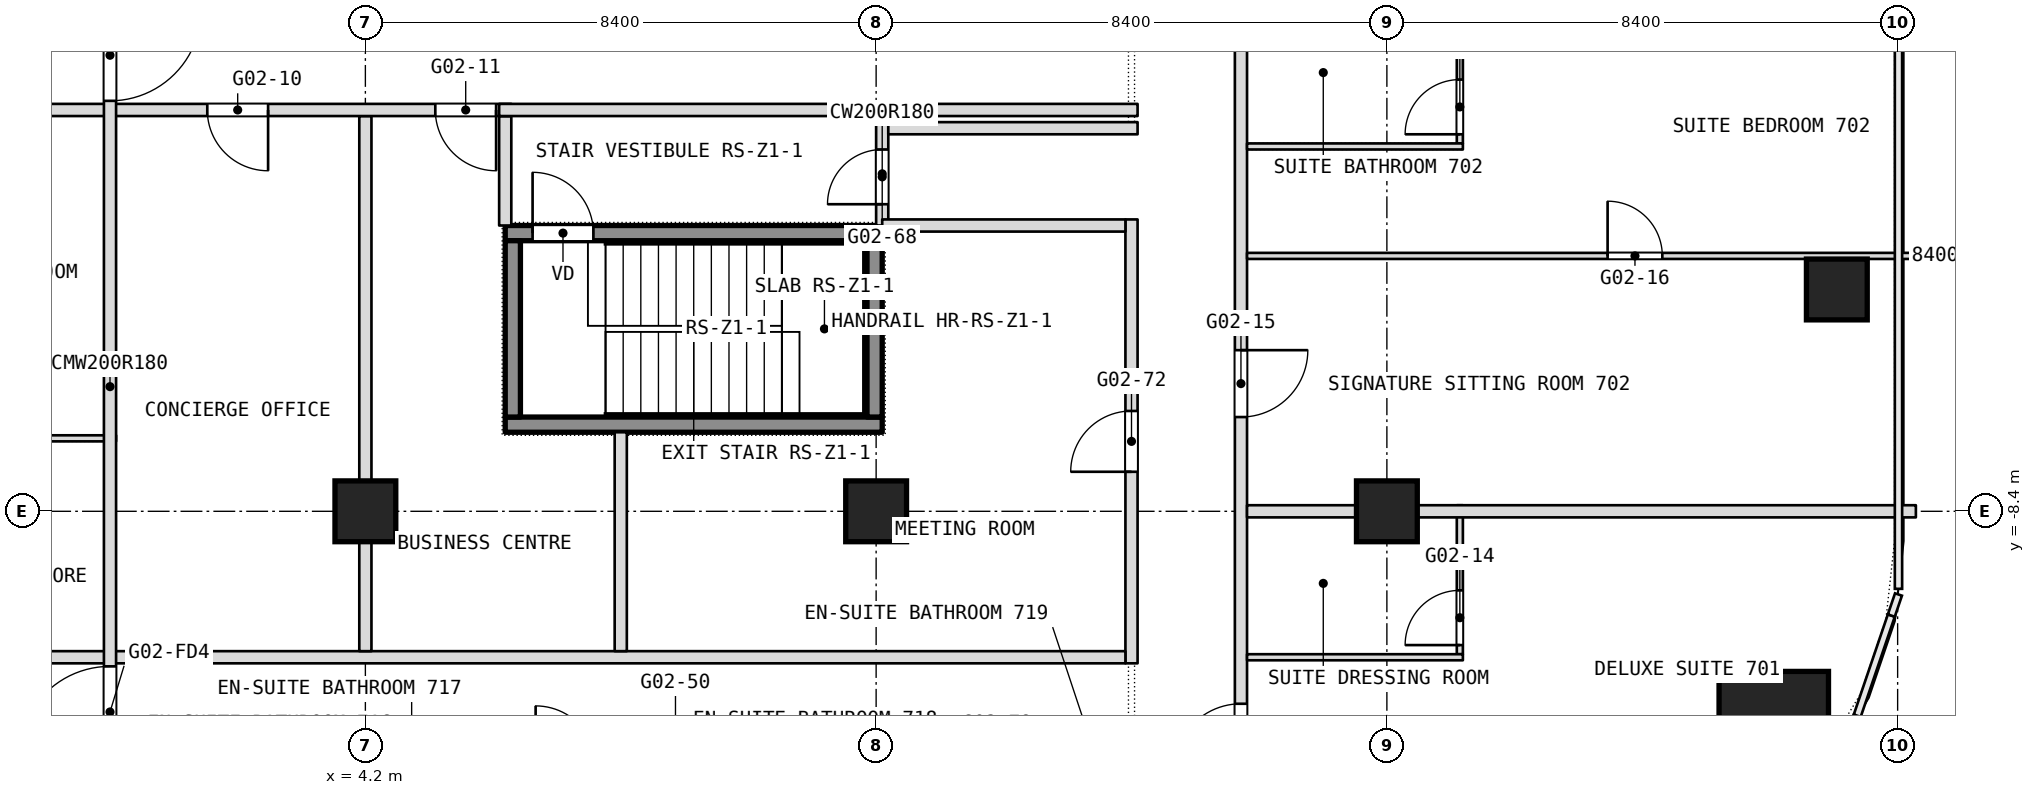
"""IFC4 building model, lengths in metres.
Left out: names, types, materials, properties, quantities, classifications, styles, units other than length and angle.
Written with IfcOpenShell. Run it as: python <this file> out.ifc"""

import sys

from ifc_helpers import new_model, si_unit, direction, frame, frame_2d, origin, origin_2d, place, context, subcontext, project, spatial, rectangle, extrude, element, fill, save


model = new_model("IFC4")
c1 = context("Model", 3, precision=1e-05, world=origin(), true_north=direction((0.0, 1.0)))
c2 = subcontext(c1, "Body", "Model", "MODEL_VIEW")
j1 = project(units=[si_unit("LENGTHUNIT", "METRE"), si_unit("PLANEANGLEUNIT", "RADIAN")], contexts=[c1])
p1 = place(None, origin())
s1 = spatial("IfcSite", under=j1, at=p1, CompositionType="ELEMENT")
p2 = place(p1, origin())
s2 = spatial("IfcBuilding", under=s1, at=p2, CompositionType="ELEMENT")
p3 = place(p2, frame((0.0, 0.0, 40.1)))
s3 = spatial("IfcBuildingStorey", under=s2, at=p3, CompositionType="ELEMENT", Elevation=40.1)
p4 = place(p3, frame((27.363, -11.933, 0.0), z_axis=(0.0, 0.0, 1.0), x_axis=(1.0, 0.0, 0.0)))
e1 = element("IfcColumn", 1, at=p4, inside=s3, PredefinedType="COLUMN", context=c2, shape_type="SweptSolid", body=[
    extrude(rectangle(XDim=1.8, YDim=1.8, at=origin_2d()), origin(), (0.0, 0.0, 1.0), 3.6),
])
for number, where, z_axis, x_axis in (
    (2, (4.2, -8.4, 0.0), (0.0, 0.0, 1.0), (1.0, 0.0, 0.0)),
    (3, (12.6, -8.4, 0.0), (0.0, 0.0, 1.0), (1.0, 0.0, 0.0)),
    (4, (21.0, -8.4, 0.0), (0.0, 0.0, 1.0), (1.0, 0.0, 0.0)),
    (5, (28.4, -4.752, 0.0), (0.0, 0.0, 1.0), (1.0, 0.0, 0.0)),
):
    element("IfcColumn", number, at=place(p3, frame(where, z_axis=z_axis, x_axis=x_axis)), inside=s3, PredefinedType="COLUMN", context=c2, shape_type="SweptSolid", body=[
        extrude(rectangle(XDim=1.0, YDim=1.0, at=origin_2d()), origin(), (0.0, 0.0, 1.0), 3.6),
    ])
p5 = place(p3, frame((22.2, -10.75, 0.0), z_axis=(0.0, 0.0, 1.0), x_axis=(0.0, 1.0, 0.0)))
e6 = element("IfcWall", 6, at=p5, inside=s3, PredefinedType="PARTITIONING", context=c2, shape_type="SweptSolid", body=[
    extrude(rectangle(XDim=2.45, YDim=0.1, at=frame_2d((1.225, 0.0))), origin(), (0.0, 0.0, 1.0), 3.34),
])
p6 = place(p5, frame((0.15, 0.0, 0.0)))
e7 = element("IfcOpeningElement", 7, at=p6, cuts=e6, PredefinedType="OPENING", context=c2, shape_type="SweptSolid", body=[
    extrude(rectangle(XDim=0.9, YDim=2.1, at=frame_2d((0.45, 1.05))), frame((0.0, 0.05, 0.0), z_axis=(0.0, -1.0, 0.0), x_axis=(1.0, 0.0, 0.0)), (0.0, 0.0, 1.0), 0.1),
])
p7 = place(p3, frame((22.2, -2.35, 0.0), z_axis=(0.0, 0.0, 1.0), x_axis=(0.0, 1.0, 0.0)))
e8 = element("IfcWall", 8, at=p7, inside=s3, PredefinedType="PARTITIONING", context=c2, shape_type="SweptSolid", body=[
    extrude(rectangle(XDim=2.45, YDim=0.1, at=frame_2d((1.225, 0.0))), origin(), (0.0, 0.0, 1.0), 3.34),
])
p8 = place(p7, frame((0.15, 0.0, 0.0)))
e9 = element("IfcOpeningElement", 9, at=p8, cuts=e8, PredefinedType="OPENING", context=c2, shape_type="SweptSolid", body=[
    extrude(rectangle(XDim=0.9, YDim=2.1, at=frame_2d((0.45, 1.05))), frame((0.0, 0.05, 0.0), z_axis=(0.0, -1.0, 0.0), x_axis=(1.0, 0.0, 0.0)), (0.0, 0.0, 1.0), 0.1),
])
p9 = place(p3, frame((18.6, -16.665, 0.0), z_axis=(0.0, 0.0, 1.0), x_axis=(0.0, 1.0, 0.0)))
e10 = element("IfcWall", 10, at=p9, inside=s3, PredefinedType="PARTITIONING", context=c2, shape_type="SweptSolid", body=[
    extrude(rectangle(XDim=50.205, YDim=0.2, at=frame_2d((25.103, 0.0))), origin(), (0.0, 0.0, 1.0), 3.34),
])
p10 = place(p9, frame((4.0, 0.0, 0.0)))
e11 = element("IfcOpeningElement", 11, at=p10, cuts=e10, PredefinedType="OPENING", context=c2, shape_type="SweptSolid", body=[
    extrude(rectangle(XDim=1.1, YDim=2.1, at=frame_2d((0.55, 1.05))), frame((0.0, 0.1, 0.0), z_axis=(0.0, -1.0, 0.0), x_axis=(1.0, 0.0, 0.0)), (0.0, 0.0, 1.0), 0.2),
])
p11 = place(p9, frame((9.815, 0.0, 0.0)))
e12 = element("IfcOpeningElement", 12, at=p11, cuts=e10, PredefinedType="OPENING", context=c2, shape_type="SweptSolid", body=[
    extrude(rectangle(XDim=1.1, YDim=2.1, at=frame_2d((0.55, 1.05))), frame((0.0, 0.1, 0.0), z_axis=(0.0, -1.0, 0.0), x_axis=(1.0, 0.0, 0.0)), (0.0, 0.0, 1.0), 0.2),
])
p12 = place(p9, frame((19.965, 0.0, 0.0)))
e13 = element("IfcOpeningElement", 13, at=p12, cuts=e10, PredefinedType="OPENING", context=c2, shape_type="SweptSolid", body=[
    extrude(rectangle(XDim=1.8, YDim=2.1, at=frame_2d((0.9, 1.05))), frame((0.0, 0.1, 0.0), z_axis=(0.0, -1.0, 0.0), x_axis=(1.0, 0.0, 0.0)), (0.0, 0.0, 1.0), 0.2),
])
p13 = place(p9, frame((25.465, 0.0, 0.0)))
e14 = element("IfcOpeningElement", 14, at=p13, cuts=e10, PredefinedType="OPENING", context=c2, shape_type="SweptSolid", body=[
    extrude(rectangle(XDim=1.0, YDim=2.1, at=frame_2d((0.5, 1.05))), frame((0.0, 0.1, 0.0), z_axis=(0.0, -1.0, 0.0), x_axis=(1.0, 0.0, 0.0)), (0.0, 0.0, 1.0), 0.2),
])
p14 = place(p9, frame((32.065, 0.0, 0.0)))
e15 = element("IfcOpeningElement", 15, at=p14, cuts=e10, PredefinedType="OPENING", context=c2, shape_type="SweptSolid", body=[
    extrude(rectangle(XDim=1.0, YDim=2.1, at=frame_2d((0.5, 1.05))), frame((0.0, 0.1, 0.0), z_axis=(0.0, -1.0, 0.0), x_axis=(1.0, 0.0, 0.0)), (0.0, 0.0, 1.0), 0.2),
])
p15 = place(p9, frame((37.165, 0.0, 0.0)))
e16 = element("IfcOpeningElement", 16, at=p15, cuts=e10, PredefinedType="OPENING", context=c2, shape_type="SweptSolid", body=[
    extrude(rectangle(XDim=1.1, YDim=2.1, at=frame_2d((0.55, 1.05))), frame((0.0, 0.1, 0.0), z_axis=(0.0, -1.0, 0.0), x_axis=(1.0, 0.0, 0.0)), (0.0, 0.0, 1.0), 0.2),
])
p16 = place(p9, frame((42.265, 0.0, 0.0)))
e17 = element("IfcOpeningElement", 17, at=p16, cuts=e10, PredefinedType="OPENING", context=c2, shape_type="SweptSolid", body=[
    extrude(rectangle(XDim=1.0, YDim=2.1, at=frame_2d((0.5, 1.05))), frame((0.0, 0.1, 0.0), z_axis=(0.0, -1.0, 0.0), x_axis=(1.0, 0.0, 0.0)), (0.0, 0.0, 1.0), 0.2),
])
p17 = place(p9, frame((46.865, 0.0, 0.0)))
e18 = element("IfcOpeningElement", 18, at=p17, cuts=e10, PredefinedType="OPENING", context=c2, shape_type="SweptSolid", body=[
    extrude(rectangle(XDim=1.0, YDim=2.1, at=frame_2d((0.5, 1.05))), frame((0.0, 0.1, 0.0), z_axis=(0.0, -1.0, 0.0), x_axis=(1.0, 0.0, 0.0)), (0.0, 0.0, 1.0), 0.2),
])
p18 = place(p3, frame((16.8, -10.9, 0.0), z_axis=(0.0, 0.0, 1.0), x_axis=(0.0, 1.0, 0.0)))
e19 = element("IfcWall", 19, at=p18, inside=s3, PredefinedType="PARTITIONING", context=c2, shape_type="SweptSolid", body=[
    extrude(rectangle(XDim=7.3, YDim=0.2, at=frame_2d((3.65, 0.0))), origin(), (0.0, 0.0, 1.0), 3.34),
])
p19 = place(p18, frame((3.15, 0.0, 0.0)))
e20 = element("IfcOpeningElement", 20, at=p19, cuts=e19, PredefinedType="OPENING", context=c2, shape_type="SweptSolid", body=[
    extrude(rectangle(XDim=1.0, YDim=2.1, at=frame_2d((0.5, 1.05))), frame((0.0, 0.1, 0.0), z_axis=(0.0, -1.0, 0.0), x_axis=(1.0, 0.0, 0.0)), (0.0, 0.0, 1.0), 0.2),
])
p20 = place(p3, frame((12.7, -3.7, 0.0), z_axis=(0.0, 0.0, 1.0), x_axis=(0.0, 1.0, 0.0)))
e21 = element("IfcWall", 21, at=p20, inside=s3, PredefinedType="PARTITIONING", context=c2, shape_type="SweptSolid", body=[
    extrude(rectangle(XDim=1.7, YDim=0.2, at=frame_2d((0.85, 0.0))), origin(), (0.0, 0.0, 1.0), 3.34),
])
p21 = place(p20, frame((0.35, 0.0, 0.0)))
e22 = element("IfcOpeningElement", 22, at=p21, cuts=e21, PredefinedType="OPENING", context=c2, shape_type="SweptSolid", body=[
    extrude(rectangle(XDim=0.9, YDim=2.1, at=frame_2d((0.45, 1.05))), frame((0.0, 0.1, 0.0), z_axis=(0.0, -1.0, 0.0), x_axis=(1.0, 0.0, 0.0)), (0.0, 0.0, 1.0), 0.2),
])
p22 = place(p3, frame((18.7, -10.8, 0.0), z_axis=(0.0, 0.0, 1.0), x_axis=(1.0, 0.0, 0.0)))
e23 = element("IfcWall", 23, at=p22, inside=s3, PredefinedType="PARTITIONING", context=c2, shape_type="SweptSolid", body=[
    extrude(rectangle(XDim=3.55, YDim=0.1, at=frame_2d((1.775, 0.0))), origin(), (0.0, 0.0, 1.0), 3.34),
])
p23 = place(p3, frame((-4.1, -10.8, 0.0), z_axis=(0.0, 0.0, 1.0), x_axis=(1.0, 0.0, 0.0)))
e24 = element("IfcWall", 24, at=p23, inside=s3, PredefinedType="PARTITIONING", context=c2, shape_type="SweptSolid", body=[
    extrude(rectangle(XDim=20.8, YDim=0.2, at=frame_2d((10.4, 0.0))), origin(), (0.0, 0.0, 1.0), 3.34),
])
p24 = place(p3, frame((8.4, -10.7, 0.0), z_axis=(0.0, 0.0, 1.0), x_axis=(0.0, 1.0, 0.0)))
e25 = element("IfcWall", 25, at=p24, inside=s3, PredefinedType="PARTITIONING", context=c2, shape_type="SweptSolid", body=[
    extrude(rectangle(XDim=3.6, YDim=0.2, at=frame_2d((1.8, 0.0))), origin(), (0.0, 0.0, 1.0), 3.34),
])
p25 = place(p3, frame((18.7, -8.4, 0.0), z_axis=(0.0, 0.0, 1.0), x_axis=(1.0, 0.0, 0.0)))
e26 = element("IfcWall", 26, at=p25, inside=s3, PredefinedType="PARTITIONING", context=c2, shape_type="SweptSolid", body=[
    extrude(rectangle(XDim=11.0, YDim=0.2, at=frame_2d((5.5, 0.0))), origin(), (0.0, 0.0, 1.0), 2.84),
])
p26 = place(p3, frame((-4.1, -7.2, 0.0), z_axis=(0.0, 0.0, 1.0), x_axis=(1.0, 0.0, 0.0)))
e27 = element("IfcWall", 27, at=p26, inside=s3, PredefinedType="PARTITIONING", context=c2, shape_type="SweptSolid", body=[
    extrude(rectangle(XDim=4.2, YDim=0.1, at=frame_2d((2.1, 0.0))), origin(), (0.0, 0.0, 1.0), 3.34),
])
p27 = place(p26, frame((1.55, 0.0, 0.0)))
e28 = element("IfcOpeningElement", 28, at=p27, cuts=e27, PredefinedType="OPENING", context=c2, shape_type="SweptSolid", body=[
    extrude(rectangle(XDim=0.9, YDim=2.1, at=frame_2d((0.45, 1.05))), frame((0.0, 0.05, 0.0), z_axis=(0.0, -1.0, 0.0), x_axis=(1.0, 0.0, 0.0)), (0.0, 0.0, 1.0), 0.1),
])
p28 = place(p3, frame((6.5, -3.7, 0.0), z_axis=(0.0, 0.0, 1.0), x_axis=(0.0, 1.0, 0.0)))
e29 = element("IfcWall", 29, at=p28, inside=s3, PredefinedType="PARTITIONING", context=c2, shape_type="SweptSolid", body=[
    extrude(rectangle(XDim=1.8, YDim=0.2, at=frame_2d((0.9, 0.0))), origin(), (0.0, 0.0, 1.0), 3.34),
])
p29 = place(p3, frame((4.2, -10.7, 0.0), z_axis=(0.0, 0.0, 1.0), x_axis=(0.0, 1.0, 0.0)))
e30 = element("IfcWall", 30, at=p29, inside=s3, PredefinedType="PARTITIONING", context=c2, shape_type="SweptSolid", body=[
    extrude(rectangle(XDim=8.8, YDim=0.2, at=frame_2d((4.4, 0.0))), origin(), (0.0, 0.0, 1.0), 3.34),
])
p30 = place(p3, frame((18.7, -4.2, 0.0), z_axis=(0.0, 0.0, 1.0), x_axis=(1.0, 0.0, 0.0)))
e31 = element("IfcWall", 31, at=p30, inside=s3, PredefinedType="PARTITIONING", context=c2, shape_type="SweptSolid", body=[
    extrude(rectangle(XDim=11.0, YDim=0.1, at=frame_2d((5.5, 0.0))), origin(), (0.0, 0.0, 1.0), 3.34),
])
p31 = place(p30, frame((5.93, 0.0, 0.0)))
e32 = element("IfcOpeningElement", 32, at=p31, cuts=e31, PredefinedType="OPENING", context=c2, shape_type="SweptSolid", body=[
    extrude(rectangle(XDim=0.9, YDim=2.1, at=frame_2d((0.45, 1.05))), frame((0.0, 0.05, 0.0), z_axis=(0.0, -1.0, 0.0), x_axis=(1.0, 0.0, 0.0)), (0.0, 0.0, 1.0), 0.1),
])
p32 = place(p3, frame((12.7, -3.7, 0.0), z_axis=(0.0, 0.0, 1.0), x_axis=(1.0, 0.0, 0.0)))
e33 = element("IfcWall", 33, at=p32, inside=s3, PredefinedType="PARTITIONING", context=c2, shape_type="SweptSolid", body=[
    extrude(rectangle(XDim=4.0, YDim=0.2, at=frame_2d((2.0, 0.0))), origin(), (0.0, 0.0, 1.0), 3.34),
])
p33 = place(p3, frame((18.7, -2.4, 0.0), z_axis=(0.0, 0.0, 1.0), x_axis=(1.0, 0.0, 0.0)))
e34 = element("IfcWall", 34, at=p33, inside=s3, PredefinedType="PARTITIONING", context=c2, shape_type="SweptSolid", body=[
    extrude(rectangle(XDim=3.55, YDim=0.1, at=frame_2d((1.775, 0.0))), origin(), (0.0, 0.0, 1.0), 3.34),
])
p34 = place(p3, frame((12.8, -2.1, 0.0), z_axis=(0.0, 0.0, 1.0), x_axis=(1.0, 0.0, 0.0)))
e35 = element("IfcWall", 35, at=p34, inside=s3, PredefinedType="PARTITIONING", context=c2, shape_type="SweptSolid", body=[
    extrude(rectangle(XDim=4.1, YDim=0.2, at=frame_2d((2.05, 0.0))), origin(), (0.0, 0.0, 1.0), 3.34),
])
p35 = place(p3, frame((-4.3, -1.8, 0.0), z_axis=(0.0, 0.0, 1.0), x_axis=(1.0, 0.0, 0.0)))
e36 = element("IfcWall", 36, at=p35, inside=s3, PredefinedType="PARTITIONING", context=c2, shape_type="SweptSolid", body=[
    extrude(rectangle(XDim=10.9, YDim=0.2, at=frame_2d((5.45, 0.0))), origin(), (0.0, 0.0, 1.0), 3.34),
])
p36 = place(p35, frame((1.7, 0.0, 0.0)))
e37 = element("IfcOpeningElement", 37, at=p36, cuts=e36, PredefinedType="OPENING", context=c2, shape_type="SweptSolid", body=[
    extrude(rectangle(XDim=1.0, YDim=2.1, at=frame_2d((0.5, 1.05))), frame((0.0, 0.1, 0.0), z_axis=(0.0, -1.0, 0.0), x_axis=(1.0, 0.0, 0.0)), (0.0, 0.0, 1.0), 0.2),
])
p37 = place(p35, frame((5.9, 0.0, 0.0)))
e38 = element("IfcOpeningElement", 38, at=p37, cuts=e36, PredefinedType="OPENING", context=c2, shape_type="SweptSolid", body=[
    extrude(rectangle(XDim=1.0, YDim=2.1, at=frame_2d((0.5, 1.05))), frame((0.0, 0.1, 0.0), z_axis=(0.0, -1.0, 0.0), x_axis=(1.0, 0.0, 0.0)), (0.0, 0.0, 1.0), 0.2),
])
p38 = place(p35, frame((9.65, 0.0, 0.0)))
e39 = element("IfcOpeningElement", 39, at=p38, cuts=e36, PredefinedType="OPENING", context=c2, shape_type="SweptSolid", body=[
    extrude(rectangle(XDim=1.0, YDim=2.1, at=frame_2d((0.5, 1.05))), frame((0.0, 0.1, 0.0), z_axis=(0.0, -1.0, 0.0), x_axis=(1.0, 0.0, 0.0)), (0.0, 0.0, 1.0), 0.2),
])
p39 = place(p3, frame((6.4, -1.8, 0.0), z_axis=(0.0, 0.0, 1.0), x_axis=(1.0, 0.0, 0.0)))
e40 = element("IfcWall", 40, at=p39, inside=s3, PredefinedType="PARTITIONING", context=c2, shape_type="SweptSolid", body=[
    extrude(rectangle(XDim=10.5, YDim=0.2, at=frame_2d((5.25, 0.0))), origin(), (0.0, 0.0, 1.0), 3.34),
])
p40 = place(p3, frame((0.0, -12.7, 0.0), z_axis=(0.0, 0.0, 1.0), x_axis=(0.0, 1.0, 0.0)))
e41 = element("IfcWall", 41, at=p40, inside=s3, PredefinedType="PARTITIONING", context=c2, shape_type="SweptSolid", body=[
    extrude(rectangle(XDim=12.7, YDim=0.2, at=frame_2d((6.35, 0.0))), origin(), (0.0, 0.0, 1.0), 3.34),
])
p41 = place(p40, frame((11.05, 0.0, 0.0)))
e42 = element("IfcOpeningElement", 42, at=p41, cuts=e41, PredefinedType="OPENING", context=c2, shape_type="SweptSolid", body=[
    extrude(rectangle(XDim=1.5, YDim=2.1, at=frame_2d((0.75, 1.05))), frame((0.0, 0.1, 0.0), z_axis=(0.0, -1.0, 0.0), x_axis=(1.0, 0.0, 0.0)), (0.0, 0.0, 1.0), 0.2),
])
p42 = place(p40, frame((0.25, 0.0, 0.0)))
e43 = element("IfcOpeningElement", 43, at=p42, cuts=e41, PredefinedType="OPENING", context=c2, shape_type="SweptSolid", body=[
    extrude(rectangle(XDim=1.5, YDim=2.1, at=frame_2d((0.75, 1.05))), frame((0.0, 0.1, 0.0), z_axis=(0.0, -1.0, 0.0), x_axis=(1.0, 0.0, 0.0)), (0.0, 0.0, 1.0), 0.2),
])
p43 = place(p3, frame((6.5, -6.975, 0.1), z_axis=(0.0, 0.0, 1.0), x_axis=(1.0, 0.0, 0.0)))
e44 = element("IfcWall", 44, at=p43, inside=s3, PredefinedType="SHEAR", context=c2, shape_type="SweptSolid", body=[
    extrude(rectangle(XDim=6.2, YDim=0.25, at=frame_2d((3.1, 0.0))), origin(), (0.0, 0.0, 1.0), 3.6),
])
p44 = place(p3, frame((6.5, -3.825, 0.1), z_axis=(0.0, 0.0, 1.0), x_axis=(1.0, 0.0, 0.0)))
e45 = element("IfcWall", 45, at=p44, inside=s3, PredefinedType="SHEAR", context=c2, shape_type="SweptSolid", body=[
    extrude(rectangle(XDim=6.2, YDim=0.25, at=frame_2d((3.1, 0.0))), origin(), (0.0, 0.0, 1.0), 3.6),
])
p45 = place(p44, frame((0.45, 0.0, 0.0)))
e46 = element("IfcOpeningElement", 46, at=p45, cuts=e45, PredefinedType="OPENING", context=c2, shape_type="SweptSolid", body=[
    extrude(rectangle(XDim=1.0, YDim=2.1, at=frame_2d((0.5, 1.05))), frame((0.0, 0.125, 0.0), z_axis=(0.0, -1.0, 0.0), x_axis=(1.0, 0.0, 0.0)), (0.0, 0.0, 1.0), 0.25),
])
for number, where, z_axis, x_axis in (
    (47, (6.625, -6.85, 0.1), (0.0, 0.0, 1.0), (0.0, 1.0, 0.0)),
    (48, (12.575, -6.85, 0.1), (0.0, 0.0, 1.0), (0.0, 1.0, 0.0)),
):
    element("IfcWall", number, at=place(p3, frame(where, z_axis=z_axis, x_axis=x_axis)), inside=s3, PredefinedType="SHEAR", context=c2, shape_type="SweptSolid", body=[
        extrude(rectangle(XDim=2.9, YDim=0.25, at=frame_2d((1.45, 0.0))), origin(), (0.0, 0.0, 1.0), 3.6),
    ])
p46 = place(p6, origin())
e49 = element("IfcDoor", 49, at=p46, inside=s3, OperationType="SINGLE_SWING_LEFT", PredefinedType="DOOR", context=c2, shape_type="SweptSolid", body=[
    extrude(rectangle(XDim=0.9, YDim=2.1, at=frame_2d((0.45, 1.05))), frame((0.0, 0.025, 0.0), z_axis=(0.0, -1.0, 0.0), x_axis=(1.0, 0.0, 0.0)), (0.0, 0.0, 1.0), 0.05),
])
fill(e7, e49)
p47 = place(p8, origin())
e50 = element("IfcDoor", 50, at=p47, inside=s3, OperationType="SINGLE_SWING_LEFT", PredefinedType="DOOR", context=c2, shape_type="SweptSolid", body=[
    extrude(rectangle(XDim=0.9, YDim=2.1, at=frame_2d((0.45, 1.05))), frame((0.0, 0.025, 0.0), z_axis=(0.0, -1.0, 0.0), x_axis=(1.0, 0.0, 0.0)), (0.0, 0.0, 1.0), 0.05),
])
fill(e9, e50)
p48 = place(p10, origin())
e51 = element("IfcDoor", 51, at=p48, inside=s3, OperationType="SINGLE_SWING_RIGHT", PredefinedType="DOOR", context=c2, shape_type="SweptSolid", body=[
    extrude(rectangle(XDim=1.1, YDim=2.1, at=frame_2d((0.55, 1.05))), frame((0.0, 0.025, 0.0), z_axis=(0.0, -1.0, 0.0), x_axis=(1.0, 0.0, 0.0)), (0.0, 0.0, 1.0), 0.05),
])
fill(e11, e51)
p49 = place(p11, origin())
e52 = element("IfcDoor", 52, at=p49, inside=s3, OperationType="SINGLE_SWING_LEFT", PredefinedType="DOOR", context=c2, shape_type="SweptSolid", body=[
    extrude(rectangle(XDim=1.1, YDim=2.1, at=frame_2d((0.55, 1.05))), frame((0.0, 0.025, 0.0), z_axis=(0.0, -1.0, 0.0), x_axis=(1.0, 0.0, 0.0)), (0.0, 0.0, 1.0), 0.05),
])
fill(e12, e52)
p50 = place(p19, origin())
e53 = element("IfcDoor", 53, at=p50, inside=s3, OperationType="SINGLE_SWING_RIGHT", PredefinedType="DOOR", context=c2, shape_type="SweptSolid", body=[
    extrude(rectangle(XDim=1.0, YDim=2.1, at=frame_2d((0.5, 1.05))), frame((0.0, 0.025, 0.0), z_axis=(0.0, -1.0, 0.0), x_axis=(1.0, 0.0, 0.0)), (0.0, 0.0, 1.0), 0.05),
])
fill(e20, e53)
p51 = place(p21, origin())
e54 = element("IfcDoor", 54, at=p51, inside=s3, OperationType="SINGLE_SWING_LEFT", PredefinedType="DOOR", context=c2, shape_type="SweptSolid", body=[
    extrude(rectangle(XDim=0.9, YDim=2.1, at=frame_2d((0.45, 1.05))), frame((0.0, 0.025, 0.0), z_axis=(0.0, -1.0, 0.0), x_axis=(1.0, 0.0, 0.0)), (0.0, 0.0, 1.0), 0.05),
])
fill(e22, e54)
p52 = place(p31, origin())
e55 = element("IfcDoor", 55, at=p52, inside=s3, OperationType="SINGLE_SWING_RIGHT", PredefinedType="DOOR", context=c2, shape_type="SweptSolid", body=[
    extrude(rectangle(XDim=0.9, YDim=2.1, at=frame_2d((0.45, 1.05))), frame((0.0, 0.025, 0.0), z_axis=(0.0, -1.0, 0.0), x_axis=(1.0, 0.0, 0.0)), (0.0, 0.0, 1.0), 0.05),
])
fill(e32, e55)
p53 = place(p37, origin())
e56 = element("IfcDoor", 56, at=p53, inside=s3, OperationType="SINGLE_SWING_RIGHT", PredefinedType="DOOR", context=c2, shape_type="SweptSolid", body=[
    extrude(rectangle(XDim=1.0, YDim=2.1, at=frame_2d((0.5, 1.05))), frame((0.0, 0.025, 0.0), z_axis=(0.0, -1.0, 0.0), x_axis=(1.0, 0.0, 0.0)), (0.0, 0.0, 1.0), 0.05),
])
fill(e38, e56)
p54 = place(p38, origin())
e57 = element("IfcDoor", 57, at=p54, inside=s3, OperationType="SINGLE_SWING_LEFT", PredefinedType="DOOR", context=c2, shape_type="SweptSolid", body=[
    extrude(rectangle(XDim=1.0, YDim=2.1, at=frame_2d((0.5, 1.05))), frame((0.0, 0.025, 0.0), z_axis=(0.0, -1.0, 0.0), x_axis=(1.0, 0.0, 0.0)), (0.0, 0.0, 1.0), 0.05),
])
fill(e39, e57)
p55 = place(p45, origin())
e58 = element("IfcDoor", 58, at=p55, inside=s3, OperationType="SINGLE_SWING_LEFT", PredefinedType="DOOR", context=c2, shape_type="SweptSolid", body=[
    extrude(rectangle(XDim=1.0, YDim=2.1, at=frame_2d((0.5, 1.05))), frame((0.0, 0.025, 0.0), z_axis=(0.0, -1.0, 0.0), x_axis=(1.0, 0.0, 0.0)), (0.0, 0.0, 1.0), 0.05),
])
fill(e46, e58)
p56 = place(p41, origin())
e59 = element("IfcDoor", 59, at=p56, inside=s3, OperationType="DOUBLE_DOOR_DOUBLE_SWING", PredefinedType="DOOR", context=c2, shape_type="SweptSolid", body=[
    extrude(rectangle(XDim=1.5, YDim=2.1, at=frame_2d((0.75, 1.05))), frame((0.0, 0.025, 0.0), z_axis=(0.0, -1.0, 0.0), x_axis=(1.0, 0.0, 0.0)), (0.0, 0.0, 1.0), 0.05),
])
fill(e42, e59)
p57 = place(p42, origin())
e60 = element("IfcDoor", 60, at=p57, inside=s3, OperationType="DOUBLE_DOOR_DOUBLE_SWING", PredefinedType="DOOR", context=c2, shape_type="SweptSolid", body=[
    extrude(rectangle(XDim=1.5, YDim=2.1, at=frame_2d((0.75, 1.05))), frame((0.0, 0.025, 0.0), z_axis=(0.0, -1.0, 0.0), x_axis=(1.0, 0.0, 0.0)), (0.0, 0.0, 1.0), 0.05),
])
fill(e43, e60)
save(model, sys.argv[1])
